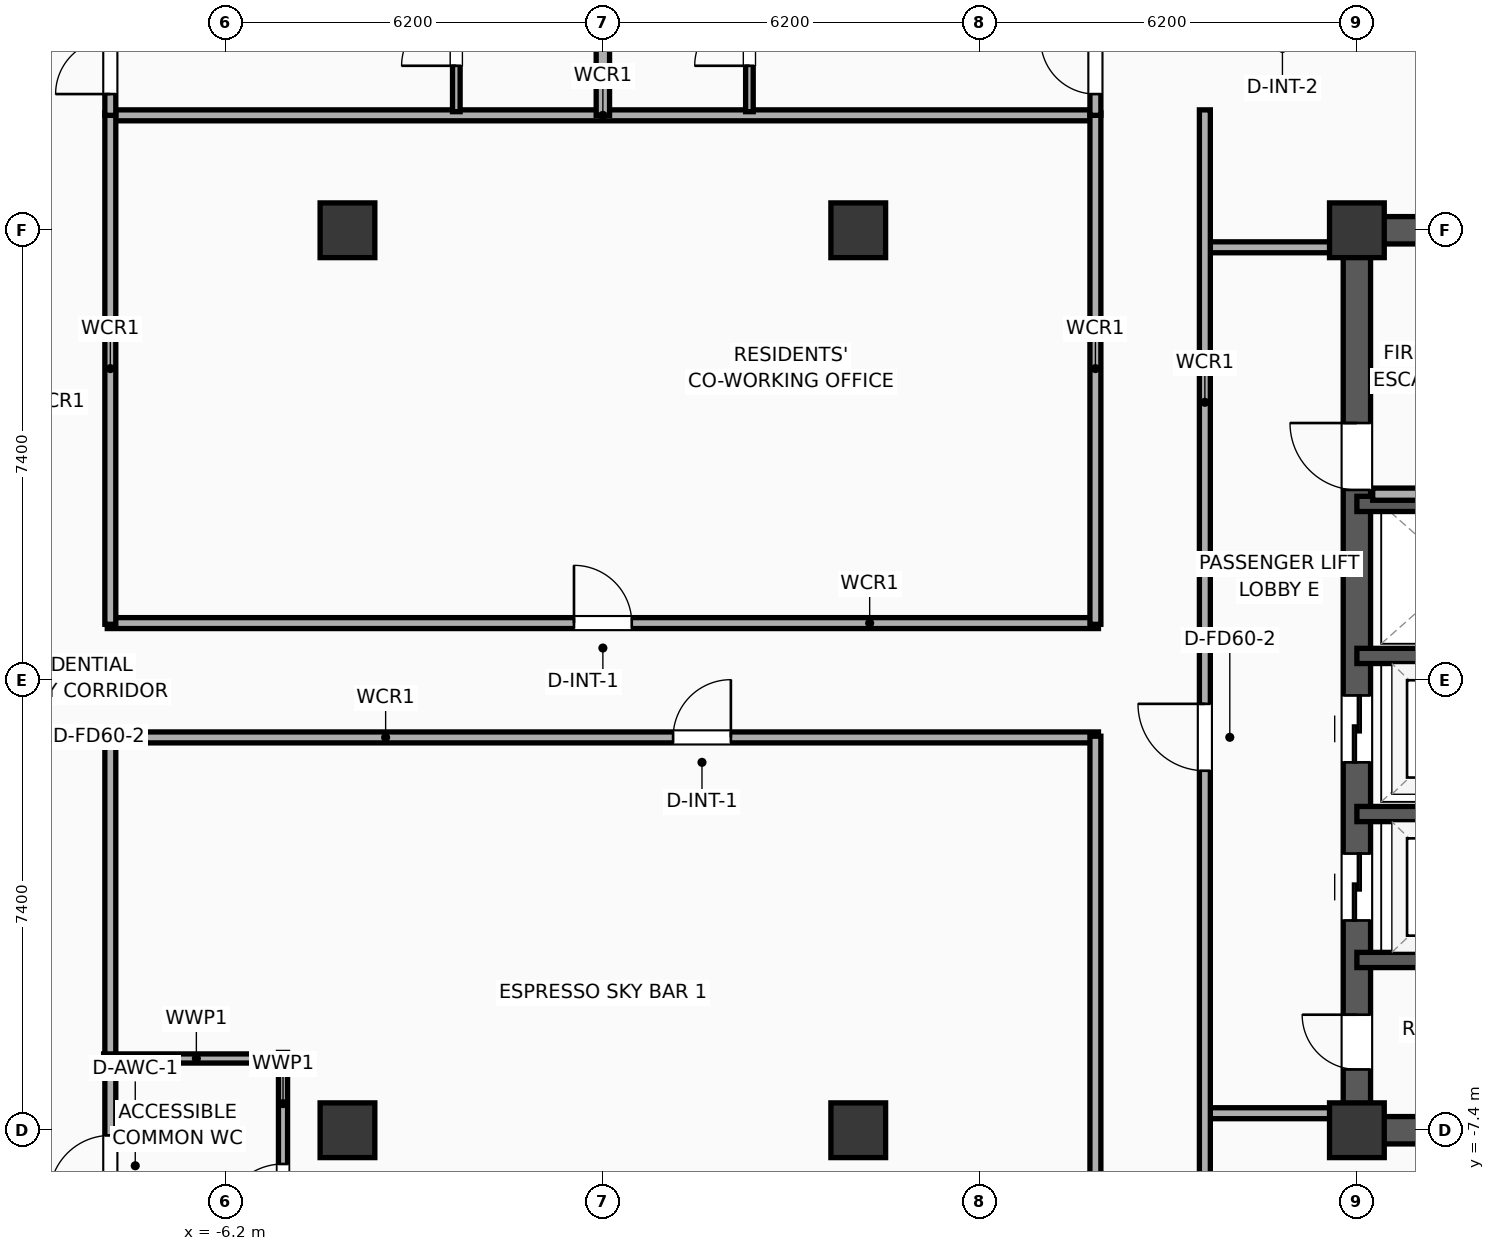
"""IFC4 building model, lengths in metres.
Left out: names, types, materials, properties, quantities, classifications, styles, units other than length and angle.
Written with IfcOpenShell. Run it as: python <this file> out.ifc"""

import sys

from ifc_helpers import new_model, si_unit, direction, frame, frame_2d, origin, origin_2d, place, context, subcontext, project, spatial, rectangle, extrude, element, fill, save


model = new_model("IFC4")
c1 = context("Model", 3, precision=1e-05, world=origin(), true_north=direction((0.0, 1.0)))
c2 = subcontext(c1, "Body", "Model", "MODEL_VIEW")
j1 = project(units=[si_unit("LENGTHUNIT", "METRE"), si_unit("PLANEANGLEUNIT", "RADIAN")], contexts=[c1])
p1 = place(None, origin())
s1 = spatial("IfcSite", under=j1, at=p1, CompositionType="ELEMENT")
p2 = place(p1, origin())
s2 = spatial("IfcBuilding", under=s1, at=p2, CompositionType="ELEMENT")
p3 = place(p2, frame((0.0, 0.0, 175.5)))
s3 = spatial("IfcBuildingStorey", under=s2, at=p3, CompositionType="ELEMENT", Elevation=175.5)
for number, where, z_axis, x_axis in (
    (1, (12.4, -7.4, 0.0), (0.0, 0.0, 1.0), (1.0, 0.0, 0.0)),
    (2, (12.4, 7.4, 0.0), (0.0, 0.0, 1.0), (1.0, 0.0, 0.0)),
):
    element("IfcColumn", number, at=place(p3, frame(where, z_axis=z_axis, x_axis=x_axis)), inside=s3, PredefinedType="COLUMN", context=c2, shape_type="SweptSolid", body=[
        extrude(rectangle(XDim=0.9, YDim=0.9, at=origin_2d()), origin(), (0.0, 0.0, 1.0), 3.9),
    ])
for number, where, z_axis, x_axis in (
    (3, (12.175, -7.4, 0.0), (0.0, 0.0, 1.0), (1.0, 0.0, 0.0)),
    (4, (12.175, 7.4, 0.0), (0.0, 0.0, 1.0), (1.0, 0.0, 0.0)),
):
    element("IfcWall", number, at=place(p3, frame(where, z_axis=z_axis, x_axis=x_axis)), inside=s3, PredefinedType="SHEAR", context=c2, shape_type="SweptSolid", body=[
        extrude(rectangle(XDim=7.25, YDim=0.45, at=frame_2d((3.625, 0.0))), origin(), (0.0, 0.0, 1.0), 3.65),
    ])
p4 = place(p3, frame((12.4, -7.4, 0.0), z_axis=(0.0, 0.0, 1.0), x_axis=(0.0, 1.0, 0.0)))
e5 = element("IfcWall", 5, at=p4, inside=s3, PredefinedType="SHEAR", context=c2, shape_type="SweptSolid", body=[
    extrude(rectangle(XDim=14.8, YDim=0.45, at=frame_2d((7.4, 0.0))), origin(), (0.0, 0.0, 1.0), 3.65),
])
p5 = place(p4, frame((3.45, 0.0, 0.0)))
e6 = element("IfcOpeningElement", 6, at=p5, cuts=e5, PredefinedType="OPENING", context=c2, shape_type="SweptSolid", body=[
    extrude(rectangle(XDim=1.1, YDim=2.05, at=frame_2d((0.55, 1.025))), frame((0.0, 0.235, 0.0), z_axis=(0.0, -1.0, 0.0), x_axis=(1.0, 0.0, 0.0)), (0.0, 0.0, 1.0), 0.47),
])
p6 = place(p4, frame((6.05, 0.0, 0.0)))
e7 = element("IfcOpeningElement", 7, at=p6, cuts=e5, PredefinedType="OPENING", context=c2, shape_type="SweptSolid", body=[
    extrude(rectangle(XDim=1.1, YDim=2.05, at=frame_2d((0.55, 1.025))), frame((0.0, 0.235, 0.0), z_axis=(0.0, -1.0, 0.0), x_axis=(1.0, 0.0, 0.0)), (0.0, 0.0, 1.0), 0.47),
])
p7 = place(p4, frame((10.53, 0.0, 0.0)))
e8 = element("IfcOpeningElement", 8, at=p7, cuts=e5, PredefinedType="OPENING", context=c2, shape_type="SweptSolid", body=[
    extrude(rectangle(XDim=1.1, YDim=2.05, at=frame_2d((0.55, 1.025))), frame((0.0, 0.235, 0.0), z_axis=(0.0, -1.0, 0.0), x_axis=(1.0, 0.0, 0.0)), (0.0, 0.0, 1.0), 0.47),
])
p8 = place(p4, frame((1.0, 0.0, 0.0)))
e9 = element("IfcOpeningElement", 9, at=p8, cuts=e5, PredefinedType="OPENING", context=c2, shape_type="SweptSolid", body=[
    extrude(rectangle(XDim=0.9, YDim=2.05, at=frame_2d((0.45, 1.025))), frame((0.0, 0.235, 0.0), z_axis=(0.0, -1.0, 0.0), x_axis=(1.0, 0.0, 0.0)), (0.0, 0.0, 1.0), 0.47),
])
for number, where, z_axis, x_axis in (
    (10, (-4.2, -7.4, 0.0), (0.0, 0.0, 1.0), (1.0, 0.0, 0.0)),
    (11, (-4.2, 7.4, 0.0), (0.0, 0.0, 1.0), (1.0, 0.0, 0.0)),
    (12, (4.2, -7.4, 0.0), (0.0, 0.0, 1.0), (1.0, 0.0, 0.0)),
    (13, (4.2, 7.4, 0.0), (0.0, 0.0, 1.0), (1.0, 0.0, 0.0)),
):
    element("IfcColumn", number, at=place(p3, frame(where, z_axis=z_axis, x_axis=x_axis)), inside=s3, PredefinedType="COLUMN", context=c2, shape_type="SweptSolid", body=[
        extrude(rectangle(XDim=0.9, YDim=0.9, at=origin_2d()), origin(), (0.0, 0.0, 1.0), 3.9),
    ])
for number, where, z_axis, x_axis in (
    (14, (12.4, -4.6, 0.0), (0.0, 0.0, 1.0), (1.0, 0.0, 0.0)),
    (15, (15.4, -2.2, 0.0), (0.0, 0.0, 1.0), (-1.0, 0.0, 0.0)),
    (16, (15.4, 0.4, 0.0), (0.0, 0.0, 1.0), (-1.0, 0.0, 0.0)),
    (17, (15.4, 2.9, 0.0), (0.0, 0.0, 1.0), (-1.0, 0.0, 0.0)),
):
    element("IfcWall", number, at=place(p3, frame(where, z_axis=z_axis, x_axis=x_axis)), inside=s3, PredefinedType="SOLIDWALL", context=c2, shape_type="SweptSolid", body=[
        extrude(rectangle(XDim=3.0, YDim=0.25, at=frame_2d((1.5, 0.0))), origin(), (0.0, 0.0, 1.0), 3.65),
    ])
p9 = place(p3, frame((12.66, 3.06, 0.0), z_axis=(0.0, 0.0, 1.0), x_axis=(1.0, 0.0, 0.0)))
e18 = element("IfcWall", 18, at=p9, inside=s3, PredefinedType="PARTITIONING", context=c2, shape_type="SweptSolid", body=[
    extrude(rectangle(XDim=3.16, YDim=0.2, at=frame_2d((1.58, 0.0))), origin(), (0.0, 0.0, 1.0), 3.65),
])
for number, where, z_axis, x_axis in (
    (19, (9.88, 7.12, 0.0), (0.0, 0.0, 1.0), (1.0, 0.0, 0.0)),
    (20, (9.88, -7.12, 0.0), (0.0, 0.0, 1.0), (1.0, 0.0, 0.0)),
):
    element("IfcWall", number, at=place(p3, frame(where, z_axis=z_axis, x_axis=x_axis)), inside=s3, PredefinedType="PARTITIONING", context=c2, shape_type="SweptSolid", body=[
        extrude(rectangle(XDim=2.27, YDim=0.18, at=frame_2d((1.135, 0.0))), origin(), (0.0, 0.0, 1.0), 3.65),
    ])
p10 = place(p3, frame((9.9, -9.38, 0.0), z_axis=(0.0, 0.0, 1.0), x_axis=(0.0, 1.0, 0.0)))
e21 = element("IfcWall", 21, at=p10, inside=s3, PredefinedType="PARTITIONING", context=c2, shape_type="SweptSolid", body=[
    extrude(rectangle(XDim=18.76, YDim=0.18, at=frame_2d((9.38, 0.0))), origin(), (0.0, 0.0, 1.0), 3.65),
])
p11 = place(p10, frame((7.892, 0.0, 0.0)))
e22 = element("IfcOpeningElement", 22, at=p11, cuts=e21, PredefinedType="OPENING", context=c2, shape_type="SweptSolid", body=[
    extrude(rectangle(XDim=1.1, YDim=2.05, at=frame_2d((0.55, 1.025))), frame((0.0, 0.1, 0.0), z_axis=(0.0, -1.0, 0.0), x_axis=(1.0, 0.0, 0.0)), (0.0, 0.0, 1.0), 0.2),
])
p12 = place(p3, frame((-8.15, 9.29, 0.0), z_axis=(0.0, 0.0, 1.0), x_axis=(1.0, 0.0, 0.0)))
e23 = element("IfcWall", 23, at=p12, inside=s3, PredefinedType="PARTITIONING", context=c2, shape_type="SweptSolid", body=[
    extrude(rectangle(XDim=16.3, YDim=0.18, at=frame_2d((8.15, 0.0))), origin(), (0.0, 0.0, 1.0), 3.65),
])
p13 = place(p3, frame((-8.15, 0.94, 0.0), z_axis=(0.0, 0.0, 1.0), x_axis=(1.0, 0.0, 0.0)))
e24 = element("IfcWall", 24, at=p13, inside=s3, PredefinedType="PARTITIONING", context=c2, shape_type="SweptSolid", body=[
    extrude(rectangle(XDim=16.3, YDim=0.18, at=frame_2d((8.15, 0.0))), origin(), (0.0, 0.0, 1.0), 3.65),
])
p14 = place(p13, frame((7.675, 0.0, 0.0)))
e25 = element("IfcOpeningElement", 25, at=p14, cuts=e24, PredefinedType="OPENING", context=c2, shape_type="SweptSolid", body=[
    extrude(rectangle(XDim=0.95, YDim=2.05, at=frame_2d((0.475, 1.025))), frame((0.0, 0.1, 0.0), z_axis=(0.0, -1.0, 0.0), x_axis=(1.0, 0.0, 0.0)), (0.0, 0.0, 1.0), 0.2),
])
p15 = place(p3, frame((-8.15, -0.94, 0.0), z_axis=(0.0, 0.0, 1.0), x_axis=(1.0, 0.0, 0.0)))
e26 = element("IfcWall", 26, at=p15, inside=s3, PredefinedType="PARTITIONING", context=c2, shape_type="SweptSolid", body=[
    extrude(rectangle(XDim=16.3, YDim=0.18, at=frame_2d((8.15, 0.0))), origin(), (0.0, 0.0, 1.0), 3.65),
])
p16 = place(p15, frame((9.305, 0.0, 0.0)))
e27 = element("IfcOpeningElement", 27, at=p16, cuts=e26, PredefinedType="OPENING", context=c2, shape_type="SweptSolid", body=[
    extrude(rectangle(XDim=0.95, YDim=2.05, at=frame_2d((0.475, 1.025))), frame((0.0, 0.1, 0.0), z_axis=(0.0, -1.0, 0.0), x_axis=(1.0, 0.0, 0.0)), (0.0, 0.0, 1.0), 0.2),
])
p17 = place(p3, frame((-8.1, 0.92, 0.0), z_axis=(0.0, 0.0, 1.0), x_axis=(0.0, 1.0, 0.0)))
e28 = element("IfcWall", 28, at=p17, inside=s3, PredefinedType="PARTITIONING", context=c2, shape_type="SweptSolid", body=[
    extrude(rectangle(XDim=8.41, YDim=0.18, at=frame_2d((4.205, 0.0))), origin(), (0.0, 0.0, 1.0), 3.65),
])
p18 = place(p3, frame((-8.1, -9.33, 0.0), z_axis=(0.0, 0.0, 1.0), x_axis=(0.0, 1.0, 0.0)))
e29 = element("IfcWall", 29, at=p18, inside=s3, PredefinedType="PARTITIONING", context=c2, shape_type="SweptSolid", body=[
    extrude(rectangle(XDim=8.41, YDim=0.18, at=frame_2d((4.205, 0.0))), origin(), (0.0, 0.0, 1.0), 3.65),
])
p19 = place(p18, frame((0.846, 0.0, 0.0)))
e30 = element("IfcOpeningElement", 30, at=p19, cuts=e29, PredefinedType="OPENING", context=c2, shape_type="SweptSolid", body=[
    extrude(rectangle(XDim=1.0, YDim=2.05, at=frame_2d((0.5, 1.025))), frame((0.0, 0.1, 0.0), z_axis=(0.0, -1.0, 0.0), x_axis=(1.0, 0.0, 0.0)), (0.0, 0.0, 1.0), 0.2),
])
for number, where, z_axis, x_axis in (
    (31, (8.1, 0.92, 0.0), (0.0, 0.0, 1.0), (0.0, 1.0, 0.0)),
    (32, (8.1, -9.33, 0.0), (0.0, 0.0, 1.0), (0.0, 1.0, 0.0)),
):
    element("IfcWall", number, at=place(p3, frame(where, z_axis=z_axis, x_axis=x_axis)), inside=s3, PredefinedType="PARTITIONING", context=c2, shape_type="SweptSolid", body=[
        extrude(rectangle(XDim=8.41, YDim=0.18, at=frame_2d((4.205, 0.0))), origin(), (0.0, 0.0, 1.0), 3.65),
    ])
p20 = place(p3, frame((-5.26, -9.47, 0.0), z_axis=(0.0, 0.0, 1.0), x_axis=(0.0, 1.0, 0.0)))
e33 = element("IfcWall", 33, at=p20, inside=s3, PredefinedType="PLUMBINGWALL", context=c2, shape_type="SweptSolid", body=[
    extrude(rectangle(XDim=3.35, YDim=0.15, at=frame_2d((1.675, 0.0))), origin(), (0.0, 0.0, 1.0), 3.65),
])
p21 = place(p20, frame((0.515, 0.0, 0.0)))
e34 = element("IfcOpeningElement", 34, at=p21, cuts=e33, PredefinedType="OPENING", context=c2, shape_type="SweptSolid", body=[
    extrude(rectangle(XDim=1.0, YDim=2.05, at=frame_2d((0.5, 1.025))), frame((0.0, 0.085, 0.0), z_axis=(0.0, -1.0, 0.0), x_axis=(1.0, 0.0, 0.0)), (0.0, 0.0, 1.0), 0.17),
])
p22 = place(p3, frame((-8.21, -6.22, 0.0), z_axis=(0.0, 0.0, 1.0), x_axis=(1.0, 0.0, 0.0)))
e35 = element("IfcWall", 35, at=p22, inside=s3, PredefinedType="PLUMBINGWALL", context=c2, shape_type="SweptSolid", body=[
    extrude(rectangle(XDim=3.05, YDim=0.15, at=frame_2d((1.525, 0.0))), origin(), (0.0, 0.0, 1.0), 3.65),
])
p23 = place(p3, frame((-2.41, 9.35, 0.0), z_axis=(0.0, 0.0, 1.0), x_axis=(0.0, 1.0, 0.0)))
e36 = element("IfcWall", 36, at=p23, inside=s3, PredefinedType="PARTITIONING", context=c2, shape_type="SweptSolid", body=[
    extrude(rectangle(XDim=2.41, YDim=0.125, at=frame_2d((1.205, 0.0))), origin(), (0.0, 0.0, 1.0), 3.65),
])
p24 = place(p23, frame((0.755, 0.0, 0.0)))
e37 = element("IfcOpeningElement", 37, at=p24, cuts=e36, PredefinedType="OPENING", context=c2, shape_type="SweptSolid", body=[
    extrude(rectangle(XDim=0.9, YDim=2.05, at=frame_2d((0.45, 1.025))), frame((0.0, 0.073, 0.0), z_axis=(0.0, -1.0, 0.0), x_axis=(1.0, 0.0, 0.0)), (0.0, 0.0, 1.0), 0.145),
])
p25 = place(p3, frame((-8.1, 9.29, 0.0), z_axis=(0.0, 0.0, 1.0), x_axis=(0.0, 1.0, 0.0)))
e38 = element("IfcWall", 38, at=p25, inside=s3, PredefinedType="PARTITIONING", context=c2, shape_type="SweptSolid", body=[
    extrude(rectangle(XDim=9.936, YDim=0.18, at=frame_2d((4.968, 0.0))), origin(), (0.0, 0.0, 1.0), 3.65),
])
p26 = place(p25, frame((0.35, 0.0, 0.0)))
e39 = element("IfcOpeningElement", 39, at=p26, cuts=e38, PredefinedType="OPENING", context=c2, shape_type="SweptSolid", body=[
    extrude(rectangle(XDim=0.9, YDim=2.05, at=frame_2d((0.45, 1.025))), frame((0.0, 0.1, 0.0), z_axis=(0.0, -1.0, 0.0), x_axis=(1.0, 0.0, 0.0)), (0.0, 0.0, 1.0), 0.2),
])
p27 = place(p3, frame((2.41, 9.35, 0.0), z_axis=(0.0, 0.0, 1.0), x_axis=(0.0, 1.0, 0.0)))
e40 = element("IfcWall", 40, at=p27, inside=s3, PredefinedType="PARTITIONING", context=c2, shape_type="SweptSolid", body=[
    extrude(rectangle(XDim=2.41, YDim=0.125, at=frame_2d((1.205, 0.0))), origin(), (0.0, 0.0, 1.0), 3.65),
])
p28 = place(p27, frame((0.755, 0.0, 0.0)))
e41 = element("IfcOpeningElement", 41, at=p28, cuts=e40, PredefinedType="OPENING", context=c2, shape_type="SweptSolid", body=[
    extrude(rectangle(XDim=0.9, YDim=2.05, at=frame_2d((0.45, 1.025))), frame((0.0, 0.073, 0.0), z_axis=(0.0, -1.0, 0.0), x_axis=(1.0, 0.0, 0.0)), (0.0, 0.0, 1.0), 0.145),
])
p29 = place(p3, frame((8.1, 9.29, 0.0), z_axis=(0.0, 0.0, 1.0), x_axis=(0.0, 1.0, 0.0)))
e42 = element("IfcWall", 42, at=p29, inside=s3, PredefinedType="PARTITIONING", context=c2, shape_type="SweptSolid", body=[
    extrude(rectangle(XDim=11.639, YDim=0.18, at=frame_2d((5.82, 0.0))), origin(), (0.0, 0.0, 1.0), 3.65),
])
p30 = place(p29, frame((0.35, 0.0, 0.0)))
e43 = element("IfcOpeningElement", 43, at=p30, cuts=e42, PredefinedType="OPENING", context=c2, shape_type="SweptSolid", body=[
    extrude(rectangle(XDim=0.9, YDim=2.05, at=frame_2d((0.45, 1.025))), frame((0.0, 0.1, 0.0), z_axis=(0.0, -1.0, 0.0), x_axis=(1.0, 0.0, 0.0)), (0.0, 0.0, 1.0), 0.2),
])
p31 = place(p3, frame((0.0, 9.29, 0.0), z_axis=(0.0, 0.0, 1.0), x_axis=(0.0, 1.0, 0.0)))
e44 = element("IfcWall", 44, at=p31, inside=s3, PredefinedType="PARTITIONING", context=c2, shape_type="SweptSolid", body=[
    extrude(rectangle(XDim=10.788, YDim=0.22, at=frame_2d((5.394, 0.0))), origin(), (0.0, 0.0, 1.0), 3.04),
])
p32 = place(p5, origin())
e45 = element("IfcDoor", 45, at=p32, inside=s3, OperationType="SLIDING_TO_LEFT", PredefinedType="DOOR", context=c2, shape_type="SweptSolid", body=[
    extrude(rectangle(XDim=1.1, YDim=2.05, at=frame_2d((0.55, 1.025))), frame((0.0, 0.025, 0.0), z_axis=(0.0, -1.0, 0.0), x_axis=(1.0, 0.0, 0.0)), (0.0, 0.0, 1.0), 0.05),
])
fill(e6, e45)
p33 = place(p6, origin())
e46 = element("IfcDoor", 46, at=p33, inside=s3, OperationType="SLIDING_TO_LEFT", PredefinedType="DOOR", context=c2, shape_type="SweptSolid", body=[
    extrude(rectangle(XDim=1.1, YDim=2.05, at=frame_2d((0.55, 1.025))), frame((0.0, 0.025, 0.0), z_axis=(0.0, -1.0, 0.0), x_axis=(1.0, 0.0, 0.0)), (0.0, 0.0, 1.0), 0.05),
])
fill(e7, e46)
p34 = place(p11, origin())
e47 = element("IfcDoor", 47, at=p34, inside=s3, OperationType="SINGLE_SWING_RIGHT", PredefinedType="DOOR", context=c2, shape_type="SweptSolid", body=[
    extrude(rectangle(XDim=1.1, YDim=2.05, at=frame_2d((0.55, 1.025))), frame((0.0, 0.025, 0.0), z_axis=(0.0, -1.0, 0.0), x_axis=(1.0, 0.0, 0.0)), (0.0, 0.0, 1.0), 0.05),
])
fill(e22, e47)
p35 = place(p14, origin())
e48 = element("IfcDoor", 48, at=p35, inside=s3, OperationType="SINGLE_SWING_LEFT", PredefinedType="DOOR", context=c2, shape_type="SweptSolid", body=[
    extrude(rectangle(XDim=0.95, YDim=2.05, at=frame_2d((0.475, 1.025))), frame((0.0, 0.025, 0.0), z_axis=(0.0, -1.0, 0.0), x_axis=(1.0, 0.0, 0.0)), (0.0, 0.0, 1.0), 0.05),
])
fill(e25, e48)
p36 = place(p16, origin())
e49 = element("IfcDoor", 49, at=p36, inside=s3, OperationType="SINGLE_SWING_RIGHT", PredefinedType="DOOR", context=c2, shape_type="SweptSolid", body=[
    extrude(rectangle(XDim=0.95, YDim=2.05, at=frame_2d((0.475, 1.025))), frame((0.0, 0.025, 0.0), z_axis=(0.0, -1.0, 0.0), x_axis=(1.0, 0.0, 0.0)), (0.0, 0.0, 1.0), 0.05),
])
fill(e27, e49)
p37 = place(p19, origin())
e50 = element("IfcDoor", 50, at=p37, inside=s3, OperationType="SINGLE_SWING_LEFT", PredefinedType="DOOR", context=c2, shape_type="SweptSolid", body=[
    extrude(rectangle(XDim=1.0, YDim=2.05, at=frame_2d((0.5, 1.025))), frame((0.0, 0.025, 0.0), z_axis=(0.0, -1.0, 0.0), x_axis=(1.0, 0.0, 0.0)), (0.0, 0.0, 1.0), 0.05),
])
fill(e30, e50)
p38 = place(p21, origin())
e51 = element("IfcDoor", 51, at=p38, inside=s3, OperationType="SINGLE_SWING_LEFT", PredefinedType="DOOR", context=c2, shape_type="SweptSolid", body=[
    extrude(rectangle(XDim=1.0, YDim=2.05, at=frame_2d((0.5, 1.025))), frame((0.0, 0.025, 0.0), z_axis=(0.0, -1.0, 0.0), x_axis=(1.0, 0.0, 0.0)), (0.0, 0.0, 1.0), 0.05),
])
fill(e34, e51)
p39 = place(p24, origin())
e52 = element("IfcDoor", 52, at=p39, inside=s3, OperationType="SINGLE_SWING_LEFT", PredefinedType="DOOR", context=c2, shape_type="SweptSolid", body=[
    extrude(rectangle(XDim=0.9, YDim=2.05, at=frame_2d((0.45, 1.025))), frame((0.0, 0.025, 0.0), z_axis=(0.0, -1.0, 0.0), x_axis=(1.0, 0.0, 0.0)), (0.0, 0.0, 1.0), 0.05),
])
fill(e37, e52)
p40 = place(p26, origin())
e53 = element("IfcDoor", 53, at=p40, inside=s3, OperationType="SINGLE_SWING_LEFT", PredefinedType="DOOR", context=c2, shape_type="SweptSolid", body=[
    extrude(rectangle(XDim=0.9, YDim=2.05, at=frame_2d((0.45, 1.025))), frame((0.0, 0.025, 0.0), z_axis=(0.0, -1.0, 0.0), x_axis=(1.0, 0.0, 0.0)), (0.0, 0.0, 1.0), 0.05),
])
fill(e39, e53)
p41 = place(p28, origin())
e54 = element("IfcDoor", 54, at=p41, inside=s3, OperationType="SINGLE_SWING_LEFT", PredefinedType="DOOR", context=c2, shape_type="SweptSolid", body=[
    extrude(rectangle(XDim=0.9, YDim=2.05, at=frame_2d((0.45, 1.025))), frame((0.0, 0.025, 0.0), z_axis=(0.0, -1.0, 0.0), x_axis=(1.0, 0.0, 0.0)), (0.0, 0.0, 1.0), 0.05),
])
fill(e41, e54)
p42 = place(p30, origin())
e55 = element("IfcDoor", 55, at=p42, inside=s3, OperationType="SINGLE_SWING_RIGHT", PredefinedType="DOOR", context=c2, shape_type="SweptSolid", body=[
    extrude(rectangle(XDim=0.9, YDim=2.05, at=frame_2d((0.45, 1.025))), frame((0.0, 0.025, 0.0), z_axis=(0.0, -1.0, 0.0), x_axis=(1.0, 0.0, 0.0)), (0.0, 0.0, 1.0), 0.05),
])
fill(e43, e55)
p43 = place(p7, origin())
e56 = element("IfcDoor", 56, at=p43, inside=s3, OperationType="SINGLE_SWING_RIGHT", PredefinedType="DOOR", context=c2, shape_type="SweptSolid", body=[
    extrude(rectangle(XDim=1.1, YDim=2.05, at=frame_2d((0.55, 1.025))), frame((0.0, 0.025, 0.0), z_axis=(0.0, -1.0, 0.0), x_axis=(1.0, 0.0, 0.0)), (0.0, 0.0, 1.0), 0.05),
])
fill(e8, e56)
p44 = place(p8, origin())
e57 = element("IfcDoor", 57, at=p44, inside=s3, OperationType="SINGLE_SWING_RIGHT", PredefinedType="DOOR", context=c2, shape_type="SweptSolid", body=[
    extrude(rectangle(XDim=0.9, YDim=2.05, at=frame_2d((0.45, 1.025))), frame((0.0, 0.025, 0.0), z_axis=(0.0, -1.0, 0.0), x_axis=(1.0, 0.0, 0.0)), (0.0, 0.0, 1.0), 0.05),
])
fill(e9, e57)
save(model, sys.argv[1])
